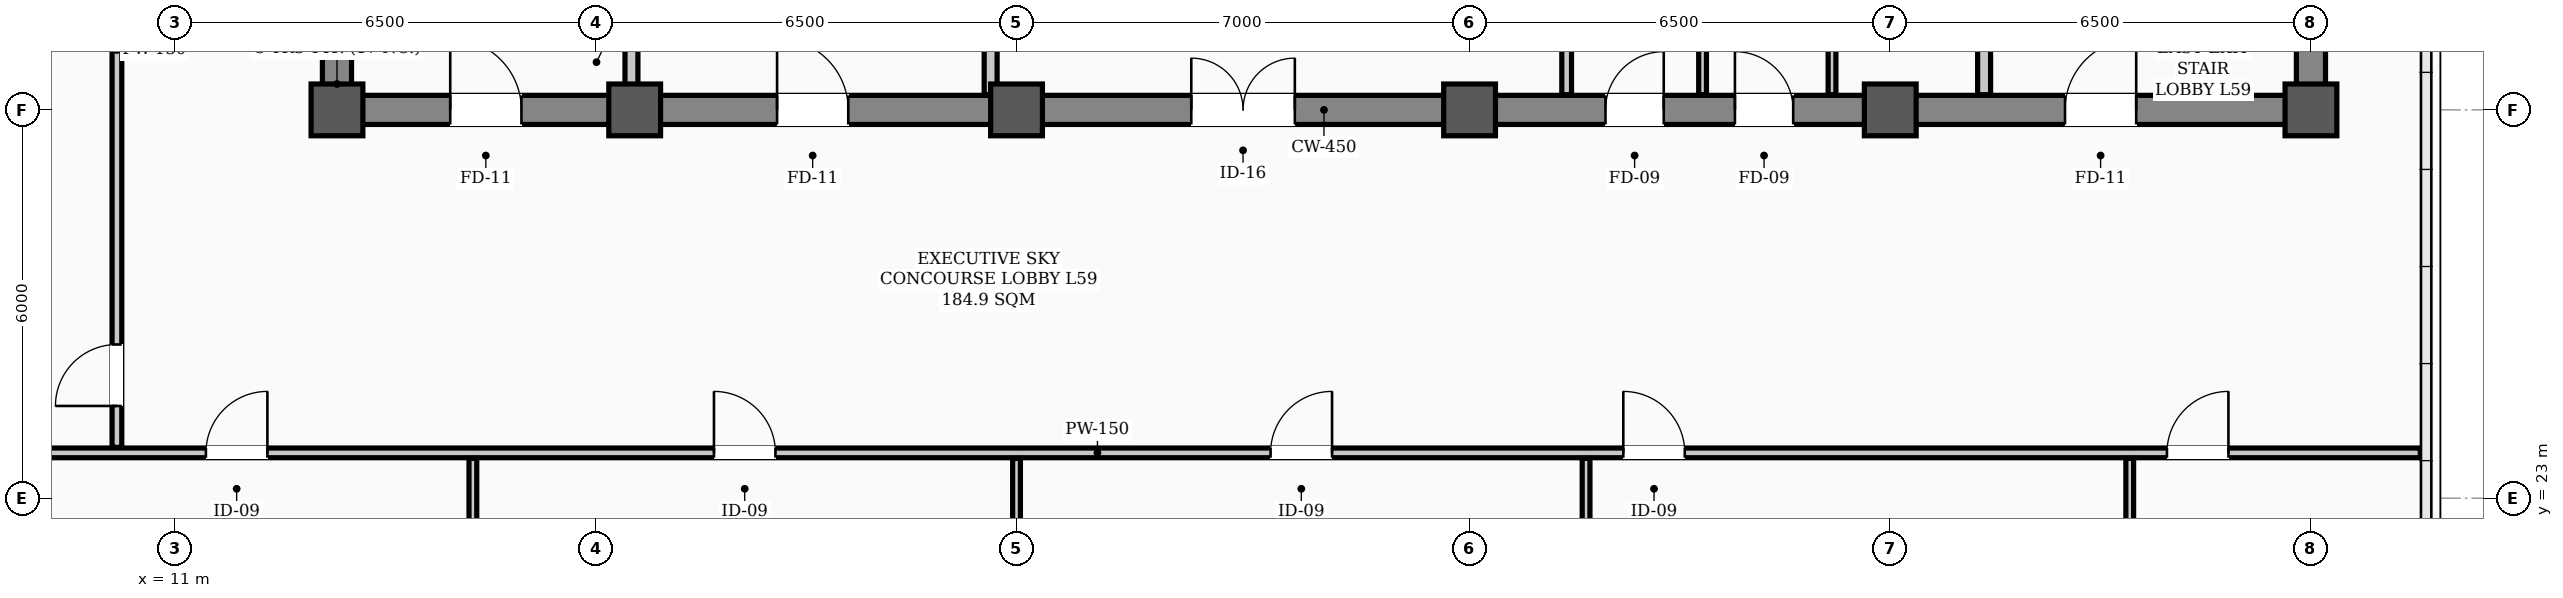
"""IFC4 building model, lengths in metres.
Left out: names, types, materials, properties, quantities, classifications, styles, units other than length and angle.
Written with IfcOpenShell. Run it as: python <this file> out.ifc"""

import sys

from ifc_helpers import new_model, si_unit, direction, frame, frame_2d, origin, origin_2d, place, context, subcontext, project, spatial, rectangle, hollow_rectangle, extrude, element, fill, save


model = new_model("IFC4")
c1 = context("Model", 3, precision=1e-05, world=origin(), true_north=direction((0.0, 1.0)))
c2 = subcontext(c1, "Body", "Model", "MODEL_VIEW")
j1 = project(units=[si_unit("LENGTHUNIT", "METRE"), si_unit("PLANEANGLEUNIT", "RADIAN")], contexts=[c1])
p1 = place(None, origin())
s1 = spatial("IfcSite", under=j1, at=p1, CompositionType="ELEMENT")
p2 = place(p1, origin())
s2 = spatial("IfcBuilding", under=s1, at=p2, CompositionType="ELEMENT")
p3 = place(p2, frame((0.0, 0.0, 238.4)))
s3 = spatial("IfcBuildingStorey", under=s2, at=p3, CompositionType="ELEMENT", Elevation=238.4)
for number, where, z_axis, x_axis in (
    (1, (13.5, 29.0, 0.0), (0.0, 0.0, 1.0), (1.0, 0.0, 0.0)),
    (2, (18.1, 29.0, 0.0), (0.0, 0.0, 1.0), (1.0, 0.0, 0.0)),
    (3, (24.0, 29.0, 0.0), (0.0, 0.0, 1.0), (1.0, 0.0, 0.0)),
    (4, (31.0, 29.0, 0.0), (0.0, 0.0, 1.0), (1.0, 0.0, 0.0)),
    (5, (37.5, 29.0, 0.0), (0.0, 0.0, 1.0), (1.0, 0.0, 0.0)),
    (6, (44.0, 29.0, 0.0), (0.0, 0.0, 1.0), (1.0, 0.0, 0.0)),
):
    element("IfcColumn", number, at=place(p3, frame(where, z_axis=z_axis, x_axis=x_axis)), inside=s3, PredefinedType="COLUMN", context=c2, shape_type="SweptSolid", body=[
        extrude(hollow_rectangle(XDim=0.8, YDim=0.8, WallThickness=0.032, InnerFilletRadius=0.016, OuterFilletRadius=0.048, at=origin_2d()), origin(), (0.0, 0.0, 1.0), 3.9),
    ])
p4 = place(p3, frame((13.5, 29.0, 0.0), z_axis=(0.0, 0.0, 1.0), x_axis=(1.0, 0.0, 0.0)))
e7 = element("IfcWall", 7, at=p4, inside=s3, PredefinedType="SHEAR", context=c2, shape_type="SweptSolid", body=[
    extrude(rectangle(XDim=30.5, YDim=0.45, at=frame_2d((15.25, 0.0))), origin(), (0.0, 0.0, 1.0), 3.72),
])
p5 = place(p4, frame((1.75, 0.0, 0.0)))
e8 = element("IfcOpeningElement", 8, at=p5, cuts=e7, PredefinedType="OPENING", context=c2, shape_type="SweptSolid", body=[
    extrude(rectangle(XDim=1.1, YDim=2.08, at=frame_2d((0.55, 1.04))), frame((0.0, 0.235, 0.0), z_axis=(0.0, -1.0, 0.0), x_axis=(1.0, 0.0, 0.0)), (0.0, 0.0, 1.0), 0.47),
])
p6 = place(p4, frame((26.7, 0.0, 0.0)))
e9 = element("IfcOpeningElement", 9, at=p6, cuts=e7, PredefinedType="OPENING", context=c2, shape_type="SweptSolid", body=[
    extrude(rectangle(XDim=1.1, YDim=2.08, at=frame_2d((0.55, 1.04))), frame((0.0, 0.235, 0.0), z_axis=(0.0, -1.0, 0.0), x_axis=(1.0, 0.0, 0.0)), (0.0, 0.0, 1.0), 0.47),
])
p7 = place(p4, frame((6.8, 0.0, 0.0)))
e10 = element("IfcOpeningElement", 10, at=p7, cuts=e7, PredefinedType="OPENING", context=c2, shape_type="SweptSolid", body=[
    extrude(rectangle(XDim=1.1, YDim=2.08, at=frame_2d((0.55, 1.04))), frame((0.0, 0.235, 0.0), z_axis=(0.0, -1.0, 0.0), x_axis=(1.0, 0.0, 0.0)), (0.0, 0.0, 1.0), 0.47),
])
p8 = place(p4, frame((13.2, 0.0, 0.0)))
e11 = element("IfcOpeningElement", 11, at=p8, cuts=e7, PredefinedType="OPENING", context=c2, shape_type="SweptSolid", body=[
    extrude(rectangle(XDim=1.6, YDim=2.08, at=frame_2d((0.8, 1.04))), frame((0.0, 0.235, 0.0), z_axis=(0.0, -1.0, 0.0), x_axis=(1.0, 0.0, 0.0)), (0.0, 0.0, 1.0), 0.47),
])
p9 = place(p4, frame((19.6, 0.0, 0.0)))
e12 = element("IfcOpeningElement", 12, at=p9, cuts=e7, PredefinedType="OPENING", context=c2, shape_type="SweptSolid", body=[
    extrude(rectangle(XDim=0.9, YDim=2.08, at=frame_2d((0.45, 1.04))), frame((0.0, 0.235, 0.0), z_axis=(0.0, -1.0, 0.0), x_axis=(1.0, 0.0, 0.0)), (0.0, 0.0, 1.0), 0.47),
])
p10 = place(p4, frame((21.6, 0.0, 0.0)))
e13 = element("IfcOpeningElement", 13, at=p10, cuts=e7, PredefinedType="OPENING", context=c2, shape_type="SweptSolid", body=[
    extrude(rectangle(XDim=0.9, YDim=2.08, at=frame_2d((0.45, 1.04))), frame((0.0, 0.235, 0.0), z_axis=(0.0, -1.0, 0.0), x_axis=(1.0, 0.0, 0.0)), (0.0, 0.0, 1.0), 0.47),
])
for number, where, z_axis, x_axis in (
    (14, (13.5, 29.35, 0.0), (0.0, 0.0, 1.0), (0.0, 1.0, 0.0)),
    (15, (44.0, 29.35, 0.0), (0.0, 0.0, 1.0), (0.0, 1.0, 0.0)),
):
    element("IfcWall", number, at=place(p3, frame(where, z_axis=z_axis, x_axis=x_axis)), inside=s3, PredefinedType="SHEAR", context=c2, shape_type="SweptSolid", body=[
        extrude(rectangle(XDim=8.6, YDim=0.45, at=frame_2d((4.3, 0.0))), origin(), (0.0, 0.0, 1.0), 3.72),
    ])
p11 = place(p3, frame((4.81, 23.7, 0.0), z_axis=(0.0, 0.0, 1.0), x_axis=(1.0, 0.0, 0.0)))
e16 = element("IfcWall", 16, at=p11, inside=s3, PredefinedType="PARTITIONING", context=c2, shape_type="SweptSolid", body=[
    extrude(rectangle(XDim=40.88, YDim=0.15, at=frame_2d((20.44, 0.0))), origin(), (0.0, 0.0, 1.0), 3.2),
])
p12 = place(p11, frame((6.665, 0.0, 0.0)))
e17 = element("IfcOpeningElement", 17, at=p12, cuts=e16, PredefinedType="OPENING", context=c2, shape_type="SweptSolid", body=[
    extrude(rectangle(XDim=0.95, YDim=2.08, at=frame_2d((0.475, 1.04))), frame((0.0, 0.085, 0.0), z_axis=(0.0, -1.0, 0.0), x_axis=(1.0, 0.0, 0.0)), (0.0, 0.0, 1.0), 0.17),
])
p13 = place(p11, frame((14.515, 0.0, 0.0)))
e18 = element("IfcOpeningElement", 18, at=p13, cuts=e16, PredefinedType="OPENING", context=c2, shape_type="SweptSolid", body=[
    extrude(rectangle(XDim=0.95, YDim=2.08, at=frame_2d((0.475, 1.04))), frame((0.0, 0.085, 0.0), z_axis=(0.0, -1.0, 0.0), x_axis=(1.0, 0.0, 0.0)), (0.0, 0.0, 1.0), 0.17),
])
p14 = place(p11, frame((23.115, 0.0, 0.0)))
e19 = element("IfcOpeningElement", 19, at=p14, cuts=e16, PredefinedType="OPENING", context=c2, shape_type="SweptSolid", body=[
    extrude(rectangle(XDim=0.95, YDim=2.08, at=frame_2d((0.475, 1.04))), frame((0.0, 0.085, 0.0), z_axis=(0.0, -1.0, 0.0), x_axis=(1.0, 0.0, 0.0)), (0.0, 0.0, 1.0), 0.17),
])
p15 = place(p11, frame((28.565, 0.0, 0.0)))
e20 = element("IfcOpeningElement", 20, at=p15, cuts=e16, PredefinedType="OPENING", context=c2, shape_type="SweptSolid", body=[
    extrude(rectangle(XDim=0.95, YDim=2.08, at=frame_2d((0.475, 1.04))), frame((0.0, 0.085, 0.0), z_axis=(0.0, -1.0, 0.0), x_axis=(1.0, 0.0, 0.0)), (0.0, 0.0, 1.0), 0.17),
])
p16 = place(p11, frame((36.965, 0.0, 0.0)))
e21 = element("IfcOpeningElement", 21, at=p16, cuts=e16, PredefinedType="OPENING", context=c2, shape_type="SweptSolid", body=[
    extrude(rectangle(XDim=0.95, YDim=2.08, at=frame_2d((0.475, 1.04))), frame((0.0, 0.085, 0.0), z_axis=(0.0, -1.0, 0.0), x_axis=(1.0, 0.0, 0.0)), (0.0, 0.0, 1.0), 0.17),
])
p17 = place(p3, frame((18.05, 29.235, 0.0), z_axis=(0.0, 0.0, 1.0), x_axis=(0.0, 1.0, 0.0)))
e22 = element("IfcWall", 22, at=p17, inside=s3, PredefinedType="STANDARD", context=c2, shape_type="SweptSolid", body=[
    extrude(rectangle(XDim=1.065, YDim=0.2, at=frame_2d((0.532, 0.0))), origin(), (0.0, 0.0, 1.0), 3.35),
])
p18 = place(p3, frame((38.95, 29.235, 0.0), z_axis=(0.0, 0.0, 1.0), x_axis=(0.0, 1.0, 0.0)))
e23 = element("IfcWall", 23, at=p18, inside=s3, PredefinedType="STANDARD", context=c2, shape_type="SweptSolid", body=[
    extrude(rectangle(XDim=1.065, YDim=0.2, at=frame_2d((0.532, 0.0))), origin(), (0.0, 0.0, 1.0), 3.72),
])
p19 = place(p3, frame((23.6, 29.235, 0.0), z_axis=(0.0, 0.0, 1.0), x_axis=(0.0, 1.0, 0.0)))
e24 = element("IfcWall", 24, at=p19, inside=s3, PredefinedType="STANDARD", context=c2, shape_type="SweptSolid", body=[
    extrude(rectangle(XDim=5.465, YDim=0.2, at=frame_2d((2.732, 0.0))), origin(), (0.0, 0.0, 1.0), 3.2),
])
p20 = place(p3, frame((32.5, 29.235, 0.0), z_axis=(0.0, 0.0, 1.0), x_axis=(0.0, 1.0, 0.0)))
e25 = element("IfcWall", 25, at=p20, inside=s3, PredefinedType="PARTITIONING", context=c2, shape_type="SweptSolid", body=[
    extrude(rectangle(XDim=2.53, YDim=0.15, at=frame_2d((1.265, 0.0))), origin(), (0.0, 0.0, 1.0), 3.35),
])
for number, where, z_axis, x_axis in (
    (26, (36.6, 29.235, 0.0), (0.0, 0.0, 1.0), (0.0, 1.0, 0.0)),
    (27, (34.6, 29.235, 0.0), (0.0, 0.0, 1.0), (0.0, 1.0, 0.0)),
):
    element("IfcWall", number, at=place(p3, frame(where, z_axis=z_axis, x_axis=x_axis)), inside=s3, PredefinedType="PARTITIONING", context=c2, shape_type="SweptSolid", body=[
        extrude(rectangle(XDim=2.53, YDim=0.12, at=frame_2d((1.265, 0.0))), origin(), (0.0, 0.0, 1.0), 3.35),
    ])
p21 = place(p3, frame((10.1, 23.785, 0.0), z_axis=(0.0, 0.0, 1.0), x_axis=(0.0, 1.0, 0.0)))
e28 = element("IfcWall", 28, at=p21, inside=s3, PredefinedType="PARTITIONING", context=c2, shape_type="SweptSolid", body=[
    extrude(rectangle(XDim=12.28, YDim=0.15, at=frame_2d((6.14, 0.0))), origin(), (0.0, 0.0, 1.0), 3.1),
])
p22 = place(p21, frame((0.64, 0.0, 0.0)))
e29 = element("IfcOpeningElement", 29, at=p22, cuts=e28, PredefinedType="OPENING", context=c2, shape_type="SweptSolid", body=[
    extrude(rectangle(XDim=0.95, YDim=2.08, at=frame_2d((0.475, 1.04))), frame((0.0, 0.085, 0.0), z_axis=(0.0, -1.0, 0.0), x_axis=(1.0, 0.0, 0.0)), (0.0, 0.0, 1.0), 0.17),
])
p23 = place(p21, frame((9.815, 0.0, 0.0)))
e30 = element("IfcOpeningElement", 30, at=p23, cuts=e28, PredefinedType="OPENING", context=c2, shape_type="SweptSolid", body=[
    extrude(rectangle(XDim=0.95, YDim=2.08, at=frame_2d((0.475, 1.04))), frame((0.0, 0.085, 0.0), z_axis=(0.0, -1.0, 0.0), x_axis=(1.0, 0.0, 0.0)), (0.0, 0.0, 1.0), 0.17),
])
p24 = place(p3, frame((15.6, 12.41, 0.0), z_axis=(0.0, 0.0, 1.0), x_axis=(0.0, 1.0, 0.0)))
e31 = element("IfcWall", 31, at=p24, inside=s3, PredefinedType="PARTITIONING", context=c2, shape_type="SweptSolid", body=[
    extrude(rectangle(XDim=11.205, YDim=0.12, at=frame_2d((5.603, 0.0))), origin(), (0.0, 0.0, 1.0), 3.1),
])
p25 = place(p3, frame((24.0, 14.17, 0.0), z_axis=(0.0, 0.0, 1.0), x_axis=(0.0, 1.0, 0.0)))
e32 = element("IfcWall", 32, at=p25, inside=s3, PredefinedType="PARTITIONING", context=c2, shape_type="SweptSolid", body=[
    extrude(rectangle(XDim=9.445, YDim=0.12, at=frame_2d((4.723, 0.0))), origin(), (0.0, 0.0, 1.0), 3.1),
])
p26 = place(p3, frame((32.8, 12.41, 0.0), z_axis=(0.0, 0.0, 1.0), x_axis=(0.0, 1.0, 0.0)))
e33 = element("IfcWall", 33, at=p26, inside=s3, PredefinedType="PARTITIONING", context=c2, shape_type="SweptSolid", body=[
    extrude(rectangle(XDim=11.205, YDim=0.12, at=frame_2d((5.603, 0.0))), origin(), (0.0, 0.0, 1.0), 3.1),
])
p27 = place(p3, frame((41.2, 12.41, 0.0), z_axis=(0.0, 0.0, 1.0), x_axis=(0.0, 1.0, 0.0)))
e34 = element("IfcWall", 34, at=p27, inside=s3, PredefinedType="PARTITIONING", context=c2, shape_type="SweptSolid", body=[
    extrude(rectangle(XDim=11.205, YDim=0.12, at=frame_2d((5.603, 0.0))), origin(), (0.0, 0.0, 1.0), 3.72),
])
p28 = place(p5, origin())
e35 = element("IfcDoor", 35, at=p28, inside=s3, OperationType="SINGLE_SWING_LEFT", PredefinedType="DOOR", context=c2, shape_type="SweptSolid", body=[
    extrude(rectangle(XDim=1.1, YDim=2.08, at=frame_2d((0.55, 1.04))), frame((0.0, 0.025, 0.0), z_axis=(0.0, -1.0, 0.0), x_axis=(1.0, 0.0, 0.0)), (0.0, 0.0, 1.0), 0.05),
])
fill(e8, e35)
p29 = place(p6, origin())
e36 = element("IfcDoor", 36, at=p29, inside=s3, OperationType="SINGLE_SWING_RIGHT", PredefinedType="DOOR", context=c2, shape_type="SweptSolid", body=[
    extrude(rectangle(XDim=1.1, YDim=2.08, at=frame_2d((0.55, 1.04))), frame((0.0, 0.025, 0.0), z_axis=(0.0, -1.0, 0.0), x_axis=(1.0, 0.0, 0.0)), (0.0, 0.0, 1.0), 0.05),
])
fill(e9, e36)
p30 = place(p7, origin())
e37 = element("IfcDoor", 37, at=p30, inside=s3, OperationType="SINGLE_SWING_LEFT", PredefinedType="DOOR", context=c2, shape_type="SweptSolid", body=[
    extrude(rectangle(XDim=1.1, YDim=2.08, at=frame_2d((0.55, 1.04))), frame((0.0, 0.025, 0.0), z_axis=(0.0, -1.0, 0.0), x_axis=(1.0, 0.0, 0.0)), (0.0, 0.0, 1.0), 0.05),
])
fill(e10, e37)
p31 = place(p8, origin())
e38 = element("IfcDoor", 38, at=p31, inside=s3, OperationType="DOUBLE_DOOR_SINGLE_SWING", PredefinedType="DOOR", context=c2, shape_type="SweptSolid", body=[
    extrude(rectangle(XDim=1.6, YDim=2.08, at=frame_2d((0.8, 1.04))), frame((0.0, 0.025, 0.0), z_axis=(0.0, -1.0, 0.0), x_axis=(1.0, 0.0, 0.0)), (0.0, 0.0, 1.0), 0.05),
])
fill(e11, e38)
p32 = place(p9, origin())
e39 = element("IfcDoor", 39, at=p32, inside=s3, OperationType="SINGLE_SWING_RIGHT", PredefinedType="DOOR", context=c2, shape_type="SweptSolid", body=[
    extrude(rectangle(XDim=0.9, YDim=2.08, at=frame_2d((0.45, 1.04))), frame((0.0, 0.025, 0.0), z_axis=(0.0, -1.0, 0.0), x_axis=(1.0, 0.0, 0.0)), (0.0, 0.0, 1.0), 0.05),
])
fill(e12, e39)
p33 = place(p10, origin())
e40 = element("IfcDoor", 40, at=p33, inside=s3, OperationType="SINGLE_SWING_LEFT", PredefinedType="DOOR", context=c2, shape_type="SweptSolid", body=[
    extrude(rectangle(XDim=0.9, YDim=2.08, at=frame_2d((0.45, 1.04))), frame((0.0, 0.025, 0.0), z_axis=(0.0, -1.0, 0.0), x_axis=(1.0, 0.0, 0.0)), (0.0, 0.0, 1.0), 0.05),
])
fill(e13, e40)
p34 = place(p12, origin())
e41 = element("IfcDoor", 41, at=p34, inside=s3, OperationType="SINGLE_SWING_RIGHT", PredefinedType="DOOR", context=c2, shape_type="SweptSolid", body=[
    extrude(rectangle(XDim=0.95, YDim=2.08, at=frame_2d((0.475, 1.04))), frame((0.0, 0.025, 0.0), z_axis=(0.0, -1.0, 0.0), x_axis=(1.0, 0.0, 0.0)), (0.0, 0.0, 1.0), 0.05),
])
fill(e17, e41)
p35 = place(p13, origin())
e42 = element("IfcDoor", 42, at=p35, inside=s3, OperationType="SINGLE_SWING_LEFT", PredefinedType="DOOR", context=c2, shape_type="SweptSolid", body=[
    extrude(rectangle(XDim=0.95, YDim=2.08, at=frame_2d((0.475, 1.04))), frame((0.0, 0.025, 0.0), z_axis=(0.0, -1.0, 0.0), x_axis=(1.0, 0.0, 0.0)), (0.0, 0.0, 1.0), 0.05),
])
fill(e18, e42)
p36 = place(p14, origin())
e43 = element("IfcDoor", 43, at=p36, inside=s3, OperationType="SINGLE_SWING_RIGHT", PredefinedType="DOOR", context=c2, shape_type="SweptSolid", body=[
    extrude(rectangle(XDim=0.95, YDim=2.08, at=frame_2d((0.475, 1.04))), frame((0.0, 0.025, 0.0), z_axis=(0.0, -1.0, 0.0), x_axis=(1.0, 0.0, 0.0)), (0.0, 0.0, 1.0), 0.05),
])
fill(e19, e43)
p37 = place(p15, origin())
e44 = element("IfcDoor", 44, at=p37, inside=s3, OperationType="SINGLE_SWING_LEFT", PredefinedType="DOOR", context=c2, shape_type="SweptSolid", body=[
    extrude(rectangle(XDim=0.95, YDim=2.08, at=frame_2d((0.475, 1.04))), frame((0.0, 0.025, 0.0), z_axis=(0.0, -1.0, 0.0), x_axis=(1.0, 0.0, 0.0)), (0.0, 0.0, 1.0), 0.05),
])
fill(e20, e44)
p38 = place(p16, origin())
e45 = element("IfcDoor", 45, at=p38, inside=s3, OperationType="SINGLE_SWING_RIGHT", PredefinedType="DOOR", context=c2, shape_type="SweptSolid", body=[
    extrude(rectangle(XDim=0.95, YDim=2.08, at=frame_2d((0.475, 1.04))), frame((0.0, 0.025, 0.0), z_axis=(0.0, -1.0, 0.0), x_axis=(1.0, 0.0, 0.0)), (0.0, 0.0, 1.0), 0.05),
])
fill(e21, e45)
p39 = place(p22, origin())
e46 = element("IfcDoor", 46, at=p39, inside=s3, OperationType="SINGLE_SWING_LEFT", PredefinedType="DOOR", context=c2, shape_type="SweptSolid", body=[
    extrude(rectangle(XDim=0.95, YDim=2.08, at=frame_2d((0.475, 1.04))), frame((0.0, 0.025, 0.0), z_axis=(0.0, -1.0, 0.0), x_axis=(1.0, 0.0, 0.0)), (0.0, 0.0, 1.0), 0.05),
])
fill(e29, e46)
save(model, sys.argv[1])
